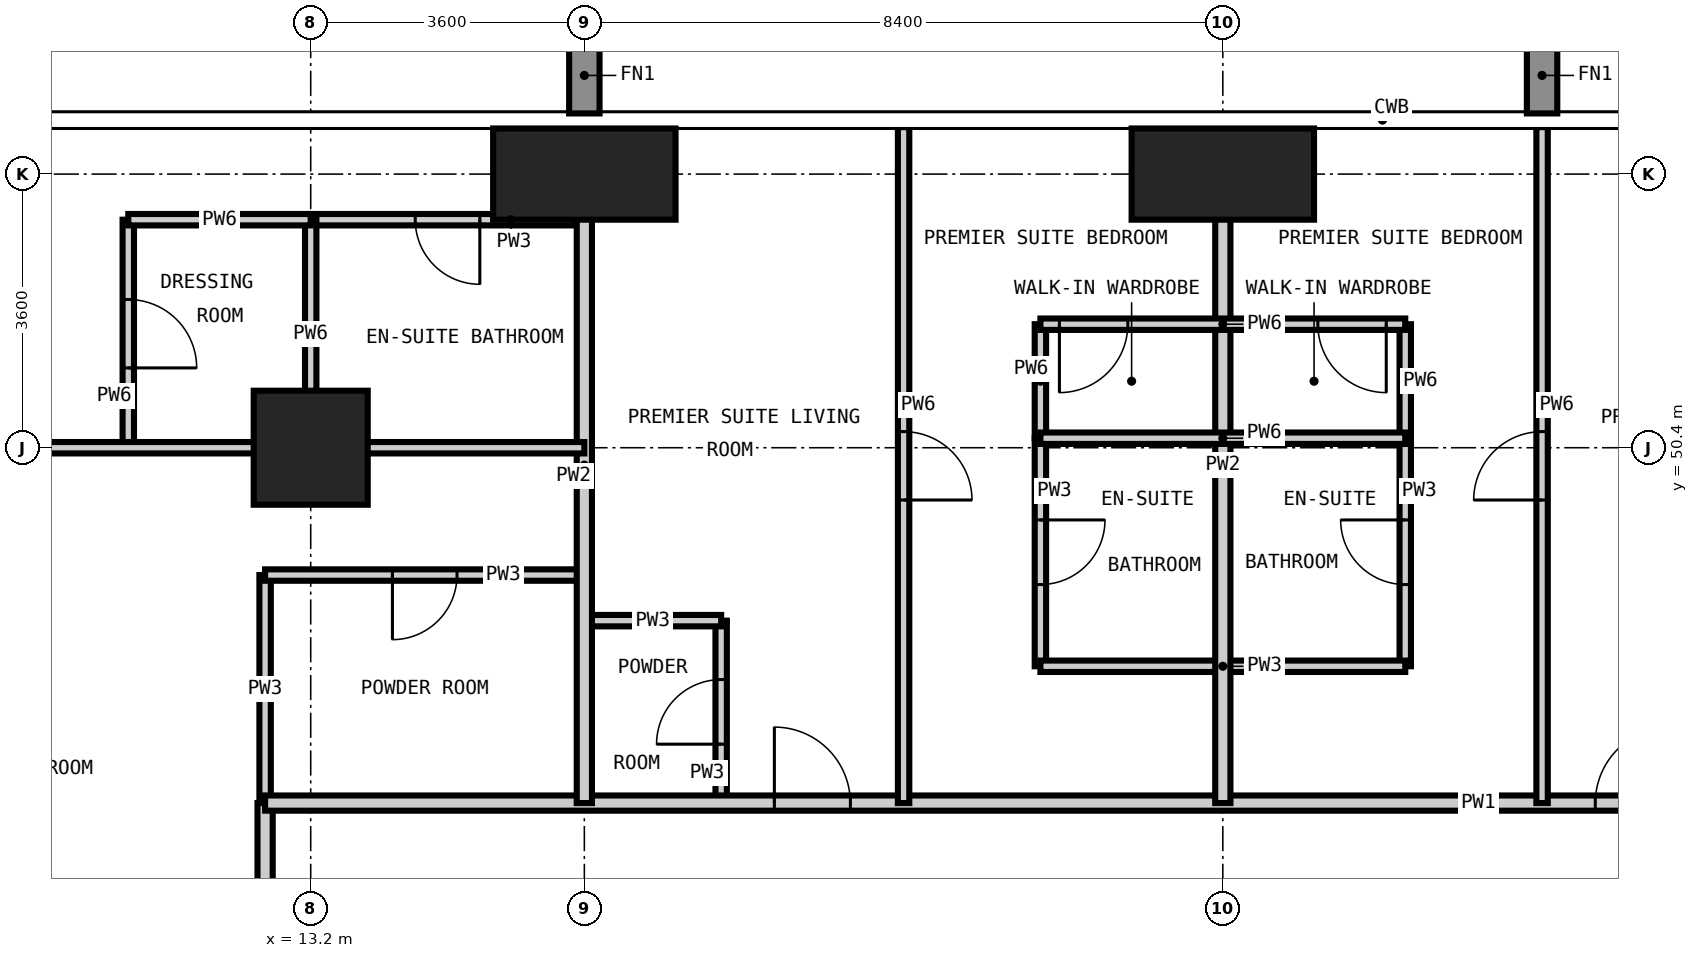
"""IFC4 building model, lengths in metres.
Left out: names, types, materials, properties, quantities, classifications, styles, units other than length and angle.
Written with IfcOpenShell. Run it as: python <this file> out.ifc"""

import sys

from ifc_helpers import new_model, si_unit, direction, frame, frame_2d, origin, origin_2d, place, context, subcontext, project, spatial, rectangle, extrude, element, fill, save


model = new_model("IFC4")
c1 = context("Model", 3, precision=1e-05, world=origin(), true_north=direction((0.0, 1.0)))
c2 = subcontext(c1, "Body", "Model", "MODEL_VIEW")
j1 = project(units=[si_unit("LENGTHUNIT", "METRE"), si_unit("PLANEANGLEUNIT", "RADIAN")], contexts=[c1])
p1 = place(None, origin())
s1 = spatial("IfcSite", under=j1, at=p1, CompositionType="ELEMENT")
p2 = place(p1, origin())
s2 = spatial("IfcBuilding", under=s1, at=p2, CompositionType="ELEMENT")
p3 = place(p2, frame((0.0, 0.0, 122.4)))
s3 = spatial("IfcBuildingStorey", under=s2, at=p3, CompositionType="ELEMENT", Elevation=122.4)
p4 = place(p3, frame((13.2, 50.4, -0.35), z_axis=(0.0, 0.0, 1.0), x_axis=(1.0, 0.0, 0.0)))
e1 = element("IfcColumn", 1, at=p4, inside=s3, PredefinedType="COLUMN", context=c2, shape_type="SweptSolid", body=[
    extrude(rectangle(XDim=1.5, YDim=1.5, at=origin_2d()), origin(), (0.0, 0.0, 1.0), 3.6),
])
for number, where, z_axis, x_axis in (
    (2, (16.8, 54.0, -0.35), (0.0, 0.0, 1.0), (1.0, 0.0, 0.0)),
    (3, (25.2, 54.0, -0.35), (0.0, 0.0, 1.0), (1.0, 0.0, 0.0)),
):
    element("IfcColumn", number, at=place(p3, frame(where, z_axis=z_axis, x_axis=x_axis)), inside=s3, PredefinedType="COLUMN", context=c2, shape_type="SweptSolid", body=[
        extrude(rectangle(XDim=2.4, YDim=1.2, at=origin_2d()), origin(), (0.0, 0.0, 1.0), 3.6),
    ])
p5 = place(p3, frame((12.6, 45.725, 0.0), z_axis=(0.0, 0.0, 1.0), x_axis=(0.0, 1.0, 0.0)))
e4 = element("IfcWall", 4, at=p5, inside=s3, PredefinedType="PARTITIONING", context=c2, shape_type="SweptSolid", body=[
    extrude(rectangle(XDim=3.0, YDim=0.15, at=frame_2d((1.5, 0.0))), origin(), (0.0, 0.0, 1.0), 3.25),
])
p6 = place(p3, frame((18.6, 45.725, 0.0), z_axis=(0.0, 0.0, 1.0), x_axis=(0.0, 1.0, 0.0)))
e5 = element("IfcWall", 5, at=p6, inside=s3, PredefinedType="PARTITIONING", context=c2, shape_type="SweptSolid", body=[
    extrude(rectangle(XDim=2.4, YDim=0.15, at=frame_2d((1.2, 0.0))), origin(), (0.0, 0.0, 1.0), 3.25),
])
p7 = place(p6, frame((0.775, 0.0, 0.0)))
e6 = element("IfcOpeningElement", 6, at=p7, cuts=e5, PredefinedType="OPENING", context=c2, shape_type="SweptSolid", body=[
    extrude(rectangle(XDim=0.85, YDim=2.1, at=frame_2d((0.425, 1.05))), frame((0.0, 0.085, 0.0), z_axis=(0.0, -1.0, 0.0), x_axis=(1.0, 0.0, 0.0)), (0.0, 0.0, 1.0), 0.17),
])
p8 = place(p3, frame((22.8, 47.525, 0.0), z_axis=(0.0, 0.0, 1.0), x_axis=(0.0, 1.0, 0.0)))
e7 = element("IfcWall", 7, at=p8, inside=s3, PredefinedType="PARTITIONING", context=c2, shape_type="SweptSolid", body=[
    extrude(rectangle(XDim=3.0, YDim=0.15, at=frame_2d((1.5, 0.0))), origin(), (0.0, 0.0, 1.0), 3.25),
])
p9 = place(p8, frame((1.075, 0.0, 0.0)))
e8 = element("IfcOpeningElement", 8, at=p9, cuts=e7, PredefinedType="OPENING", context=c2, shape_type="SweptSolid", body=[
    extrude(rectangle(XDim=0.85, YDim=2.1, at=frame_2d((0.425, 1.05))), frame((0.0, 0.085, 0.0), z_axis=(0.0, -1.0, 0.0), x_axis=(1.0, 0.0, 0.0)), (0.0, 0.0, 1.0), 0.17),
])
p10 = place(p3, frame((27.6, 47.525, 0.0), z_axis=(0.0, 0.0, 1.0), x_axis=(0.0, 1.0, 0.0)))
e9 = element("IfcWall", 9, at=p10, inside=s3, PredefinedType="PARTITIONING", context=c2, shape_type="SweptSolid", body=[
    extrude(rectangle(XDim=3.0, YDim=0.15, at=frame_2d((1.5, 0.0))), origin(), (0.0, 0.0, 1.0), 3.25),
])
p11 = place(p10, frame((1.075, 0.0, 0.0)))
e10 = element("IfcOpeningElement", 10, at=p11, cuts=e9, PredefinedType="OPENING", context=c2, shape_type="SweptSolid", body=[
    extrude(rectangle(XDim=0.85, YDim=2.1, at=frame_2d((0.425, 1.05))), frame((0.0, 0.085, 0.0), z_axis=(0.0, -1.0, 0.0), x_axis=(1.0, 0.0, 0.0)), (0.0, 0.0, 1.0), 0.17),
])
p12 = place(p3, frame((22.8, 47.525, 0.0), z_axis=(0.0, 0.0, 1.0), x_axis=(1.0, 0.0, 0.0)))
e11 = element("IfcWall", 11, at=p12, inside=s3, PredefinedType="PARTITIONING", context=c2, shape_type="SweptSolid", body=[
    extrude(rectangle(XDim=4.8, YDim=0.15, at=frame_2d((2.4, 0.0))), origin(), (0.0, 0.0, 1.0), 3.25),
])
p13 = place(p3, frame((16.8, 48.125, 0.0), z_axis=(0.0, 0.0, 1.0), x_axis=(1.0, 0.0, 0.0)))
e12 = element("IfcWall", 12, at=p13, inside=s3, PredefinedType="PARTITIONING", context=c2, shape_type="SweptSolid", body=[
    extrude(rectangle(XDim=1.8, YDim=0.15, at=frame_2d((0.9, 0.0))), origin(), (0.0, 0.0, 1.0), 3.25),
])
p14 = place(p3, frame((12.6, 48.725, 0.0), z_axis=(0.0, 0.0, 1.0), x_axis=(1.0, 0.0, 0.0)))
e13 = element("IfcWall", 13, at=p14, inside=s3, PredefinedType="PARTITIONING", context=c2, shape_type="SweptSolid", body=[
    extrude(rectangle(XDim=4.2, YDim=0.15, at=frame_2d((2.1, 0.0))), origin(), (0.0, 0.0, 1.0), 3.25),
])
p15 = place(p14, frame((1.675, 0.0, 0.0)))
e14 = element("IfcOpeningElement", 14, at=p15, cuts=e13, PredefinedType="OPENING", context=c2, shape_type="SweptSolid", body=[
    extrude(rectangle(XDim=0.85, YDim=2.1, at=frame_2d((0.425, 1.05))), frame((0.0, 0.085, 0.0), z_axis=(0.0, -1.0, 0.0), x_axis=(1.0, 0.0, 0.0)), (0.0, 0.0, 1.0), 0.17),
])
p16 = place(p3, frame((13.2, 53.4, 0.0), z_axis=(0.0, 0.0, 1.0), x_axis=(1.0, 0.0, 0.0)))
e15 = element("IfcWall", 15, at=p16, inside=s3, PredefinedType="PARTITIONING", context=c2, shape_type="SweptSolid", body=[
    extrude(rectangle(XDim=3.6, YDim=0.15, at=frame_2d((1.8, 0.0))), origin(), (0.0, 0.0, 1.0), 3.25),
])
p17 = place(p16, frame((1.375, 0.0, 0.0)))
e16 = element("IfcOpeningElement", 16, at=p17, cuts=e15, PredefinedType="OPENING", context=c2, shape_type="SweptSolid", body=[
    extrude(rectangle(XDim=0.85, YDim=2.1, at=frame_2d((0.425, 1.05))), frame((0.0, 0.085, 0.0), z_axis=(0.0, -1.0, 0.0), x_axis=(1.0, 0.0, 0.0)), (0.0, 0.0, 1.0), 0.17),
])
p18 = place(p3, frame((12.6, 13.675, 0.0), z_axis=(0.0, 0.0, 1.0), x_axis=(0.0, 1.0, 0.0)))
e17 = element("IfcWall", 17, at=p18, inside=s3, PredefinedType="PARTITIONING", context=c2, shape_type="SweptSolid", body=[
    extrude(rectangle(XDim=32.05, YDim=0.2, at=frame_2d((16.025, 0.0))), origin(), (0.0, 0.0, 1.0), 3.25),
])
p19 = place(p18, frame((6.825, 0.0, 0.0)))
e18 = element("IfcOpeningElement", 18, at=p19, cuts=e17, PredefinedType="OPENING", context=c2, shape_type="SweptSolid", body=[
    extrude(rectangle(XDim=1.0, YDim=2.2, at=frame_2d((0.5, 1.1))), frame((0.0, 0.11, 0.0), z_axis=(0.0, -1.0, 0.0), x_axis=(1.0, 0.0, 0.0)), (0.0, 0.0, 1.0), 0.22),
])
p20 = place(p18, frame((15.225, 0.0, 0.0)))
e19 = element("IfcOpeningElement", 19, at=p20, cuts=e17, PredefinedType="OPENING", context=c2, shape_type="SweptSolid", body=[
    extrude(rectangle(XDim=1.0, YDim=2.2, at=frame_2d((0.5, 1.1))), frame((0.0, 0.11, 0.0), z_axis=(0.0, -1.0, 0.0), x_axis=(1.0, 0.0, 0.0)), (0.0, 0.0, 1.0), 0.22),
])
p21 = place(p18, frame((23.625, 0.0, 0.0)))
e20 = element("IfcOpeningElement", 20, at=p21, cuts=e17, PredefinedType="OPENING", context=c2, shape_type="SweptSolid", body=[
    extrude(rectangle(XDim=1.0, YDim=2.2, at=frame_2d((0.5, 1.1))), frame((0.0, 0.11, 0.0), z_axis=(0.0, -1.0, 0.0), x_axis=(1.0, 0.0, 0.0)), (0.0, 0.0, 1.0), 0.22),
])
p22 = place(p18, frame((1.063, 0.0, 0.0)))
e21 = element("IfcOpeningElement", 21, at=p22, cuts=e17, PredefinedType="OPENING", context=c2, shape_type="SweptSolid", body=[
    extrude(rectangle(XDim=1.0, YDim=2.2, at=frame_2d((0.5, 1.1))), frame((0.0, 0.11, 0.0), z_axis=(0.0, -1.0, 0.0), x_axis=(1.0, 0.0, 0.0)), (0.0, 0.0, 1.0), 0.22),
])
p23 = place(p18, frame((29.687, 0.0, 0.0)))
e22 = element("IfcOpeningElement", 22, at=p23, cuts=e17, PredefinedType="OPENING", context=c2, shape_type="SweptSolid", body=[
    extrude(rectangle(XDim=1.0, YDim=2.2, at=frame_2d((0.5, 1.1))), frame((0.0, 0.11, 0.0), z_axis=(0.0, -1.0, 0.0), x_axis=(1.0, 0.0, 0.0)), (0.0, 0.0, 1.0), 0.22),
])
p24 = place(p3, frame((12.6, 45.725, 0.0), z_axis=(0.0, 0.0, 1.0), x_axis=(1.0, 0.0, 0.0)))
e23 = element("IfcWall", 23, at=p24, inside=s3, PredefinedType="PARTITIONING", context=c2, shape_type="SweptSolid", body=[
    extrude(rectangle(XDim=31.925, YDim=0.2, at=frame_2d((15.962, 0.0))), origin(), (0.0, 0.0, 1.0), 3.25),
])
p25 = place(p24, frame((6.7, 0.0, 0.0)))
e24 = element("IfcOpeningElement", 24, at=p25, cuts=e23, PredefinedType="OPENING", context=c2, shape_type="SweptSolid", body=[
    extrude(rectangle(XDim=1.0, YDim=2.2, at=frame_2d((0.5, 1.1))), frame((0.0, 0.11, 0.0), z_axis=(0.0, -1.0, 0.0), x_axis=(1.0, 0.0, 0.0)), (0.0, 0.0, 1.0), 0.22),
])
p26 = place(p24, frame((17.5, 0.0, 0.0)))
e25 = element("IfcOpeningElement", 25, at=p26, cuts=e23, PredefinedType="OPENING", context=c2, shape_type="SweptSolid", body=[
    extrude(rectangle(XDim=1.0, YDim=2.2, at=frame_2d((0.5, 1.1))), frame((0.0, 0.11, 0.0), z_axis=(0.0, -1.0, 0.0), x_axis=(1.0, 0.0, 0.0)), (0.0, 0.0, 1.0), 0.22),
])
p27 = place(p24, frame((23.5, 0.0, 0.0)))
e26 = element("IfcOpeningElement", 26, at=p27, cuts=e23, PredefinedType="OPENING", context=c2, shape_type="SweptSolid", body=[
    extrude(rectangle(XDim=1.0, YDim=2.2, at=frame_2d((0.5, 1.1))), frame((0.0, 0.11, 0.0), z_axis=(0.0, -1.0, 0.0), x_axis=(1.0, 0.0, 0.0)), (0.0, 0.0, 1.0), 0.22),
])
for number, where, z_axis, x_axis in (
    (27, (16.8, 45.725, 0.0), (0.0, 0.0, 1.0), (0.0, 1.0, 0.0)),
    (28, (25.2, 45.725, 0.0), (0.0, 0.0, 1.0), (0.0, 1.0, 0.0)),
):
    element("IfcWall", number, at=place(p3, frame(where, z_axis=z_axis, x_axis=x_axis)), inside=s3, PredefinedType="PARTITIONING", context=c2, shape_type="SweptSolid", body=[
        extrude(rectangle(XDim=8.893, YDim=0.2, at=frame_2d((4.446, 0.0))), origin(), (0.0, 0.0, 1.0), 3.25),
    ])
p28 = place(p3, frame((10.8, 50.4, 0.0), z_axis=(0.0, 0.0, 1.0), x_axis=(0.0, 1.0, 0.0)))
e29 = element("IfcWall", 29, at=p28, inside=s3, PredefinedType="PARTITIONING", context=c2, shape_type="SweptSolid", body=[
    extrude(rectangle(XDim=3.0, YDim=0.15, at=frame_2d((1.5, 0.0))), origin(), (0.0, 0.0, 1.0), 3.25),
])
p29 = place(p28, frame((1.05, 0.0, 0.0)))
e30 = element("IfcOpeningElement", 30, at=p29, cuts=e29, PredefinedType="OPENING", context=c2, shape_type="SweptSolid", body=[
    extrude(rectangle(XDim=0.9, YDim=2.1, at=frame_2d((0.45, 1.05))), frame((0.0, 0.085, 0.0), z_axis=(0.0, -1.0, 0.0), x_axis=(1.0, 0.0, 0.0)), (0.0, 0.0, 1.0), 0.17),
])
p30 = place(p3, frame((13.2, 50.4, 0.0), z_axis=(0.0, 0.0, 1.0), x_axis=(0.0, 1.0, 0.0)))
e31 = element("IfcWall", 31, at=p30, inside=s3, PredefinedType="PARTITIONING", context=c2, shape_type="SweptSolid", body=[
    extrude(rectangle(XDim=3.0, YDim=0.15, at=frame_2d((1.5, 0.0))), origin(), (0.0, 0.0, 1.0), 3.25),
])
p31 = place(p3, frame((21.0, 45.725, 0.0), z_axis=(0.0, 0.0, 1.0), x_axis=(0.0, 1.0, 0.0)))
e32 = element("IfcWall", 32, at=p31, inside=s3, PredefinedType="PARTITIONING", context=c2, shape_type="SweptSolid", body=[
    extrude(rectangle(XDim=8.893, YDim=0.15, at=frame_2d((4.446, 0.0))), origin(), (0.0, 0.0, 1.0), 3.25),
])
p32 = place(p31, frame((3.987, 0.0, 0.0)))
e33 = element("IfcOpeningElement", 33, at=p32, cuts=e32, PredefinedType="OPENING", context=c2, shape_type="SweptSolid", body=[
    extrude(rectangle(XDim=0.9, YDim=2.1, at=frame_2d((0.45, 1.05))), frame((0.0, 0.085, 0.0), z_axis=(0.0, -1.0, 0.0), x_axis=(1.0, 0.0, 0.0)), (0.0, 0.0, 1.0), 0.17),
])
for number, where, z_axis, x_axis in (
    (34, (22.8, 50.525, 0.0), (0.0, 0.0, 1.0), (0.0, 1.0, 0.0)),
    (35, (27.6, 50.525, 0.0), (0.0, 0.0, 1.0), (0.0, 1.0, 0.0)),
):
    element("IfcWall", number, at=place(p3, frame(where, z_axis=z_axis, x_axis=x_axis)), inside=s3, PredefinedType="PARTITIONING", context=c2, shape_type="SweptSolid", body=[
        extrude(rectangle(XDim=1.5, YDim=0.15, at=frame_2d((0.75, 0.0))), origin(), (0.0, 0.0, 1.0), 3.25),
    ])
p33 = place(p3, frame((29.4, 45.725, 0.0), z_axis=(0.0, 0.0, 1.0), x_axis=(0.0, 1.0, 0.0)))
e36 = element("IfcWall", 36, at=p33, inside=s3, PredefinedType="PARTITIONING", context=c2, shape_type="SweptSolid", body=[
    extrude(rectangle(XDim=8.893, YDim=0.15, at=frame_2d((4.446, 0.0))), origin(), (0.0, 0.0, 1.0), 3.25),
])
p34 = place(p33, frame((3.987, 0.0, 0.0)))
e37 = element("IfcOpeningElement", 37, at=p34, cuts=e36, PredefinedType="OPENING", context=c2, shape_type="SweptSolid", body=[
    extrude(rectangle(XDim=0.9, YDim=2.1, at=frame_2d((0.45, 1.05))), frame((0.0, 0.085, 0.0), z_axis=(0.0, -1.0, 0.0), x_axis=(1.0, 0.0, 0.0)), (0.0, 0.0, 1.0), 0.17),
])
p35 = place(p3, frame((-0.018, 50.4, 0.0), z_axis=(0.0, 0.0, 1.0), x_axis=(1.0, 0.0, 0.0)))
e38 = element("IfcWall", 38, at=p35, inside=s3, PredefinedType="PARTITIONING", context=c2, shape_type="SweptSolid", body=[
    extrude(rectangle(XDim=16.818, YDim=0.15, at=frame_2d((8.409, 0.0))), origin(), (0.0, 0.0, 1.0), 3.25),
])
p36 = place(p35, frame((5.668, 0.0, 0.0)))
e39 = element("IfcOpeningElement", 39, at=p36, cuts=e38, PredefinedType="OPENING", context=c2, shape_type="SweptSolid", body=[
    extrude(rectangle(XDim=0.9, YDim=2.1, at=frame_2d((0.45, 1.05))), frame((0.0, 0.085, 0.0), z_axis=(0.0, -1.0, 0.0), x_axis=(1.0, 0.0, 0.0)), (0.0, 0.0, 1.0), 0.17),
])
p37 = place(p3, frame((22.8, 50.525, 0.0), z_axis=(0.0, 0.0, 1.0), x_axis=(1.0, 0.0, 0.0)))
e40 = element("IfcWall", 40, at=p37, inside=s3, PredefinedType="PARTITIONING", context=c2, shape_type="SweptSolid", body=[
    extrude(rectangle(XDim=4.8, YDim=0.15, at=frame_2d((2.4, 0.0))), origin(), (0.0, 0.0, 1.0), 3.25),
])
p38 = place(p3, frame((22.8, 52.025, 0.0), z_axis=(0.0, 0.0, 1.0), x_axis=(1.0, 0.0, 0.0)))
e41 = element("IfcWall", 41, at=p38, inside=s3, PredefinedType="PARTITIONING", context=c2, shape_type="SweptSolid", body=[
    extrude(rectangle(XDim=4.8, YDim=0.15, at=frame_2d((2.4, 0.0))), origin(), (0.0, 0.0, 1.0), 3.25),
])
p39 = place(p38, frame((0.25, 0.0, 0.0)))
e42 = element("IfcOpeningElement", 42, at=p39, cuts=e41, PredefinedType="OPENING", context=c2, shape_type="SweptSolid", body=[
    extrude(rectangle(XDim=0.9, YDim=2.1, at=frame_2d((0.45, 1.05))), frame((0.0, 0.085, 0.0), z_axis=(0.0, -1.0, 0.0), x_axis=(1.0, 0.0, 0.0)), (0.0, 0.0, 1.0), 0.17),
])
p40 = place(p38, frame((3.65, 0.0, 0.0)))
e43 = element("IfcOpeningElement", 43, at=p40, cuts=e41, PredefinedType="OPENING", context=c2, shape_type="SweptSolid", body=[
    extrude(rectangle(XDim=0.9, YDim=2.1, at=frame_2d((0.45, 1.05))), frame((0.0, 0.085, 0.0), z_axis=(0.0, -1.0, 0.0), x_axis=(1.0, 0.0, 0.0)), (0.0, 0.0, 1.0), 0.17),
])
p41 = place(p3, frame((10.8, 53.4, 0.0), z_axis=(0.0, 0.0, 1.0), x_axis=(1.0, 0.0, 0.0)))
e44 = element("IfcWall", 44, at=p41, inside=s3, PredefinedType="PARTITIONING", context=c2, shape_type="SweptSolid", body=[
    extrude(rectangle(XDim=2.4, YDim=0.15, at=frame_2d((1.2, 0.0))), origin(), (0.0, 0.0, 1.0), 3.25),
])
p42 = place(p25, origin())
e45 = element("IfcDoor", 45, at=p42, inside=s3, OperationType="SINGLE_SWING_LEFT", PredefinedType="DOOR", context=c2, shape_type="SweptSolid", body=[
    extrude(rectangle(XDim=1.0, YDim=2.2, at=frame_2d((0.5, 1.1))), frame((0.0, 0.025, 0.0), z_axis=(0.0, -1.0, 0.0), x_axis=(1.0, 0.0, 0.0)), (0.0, 0.0, 1.0), 0.05),
])
fill(e24, e45)
p43 = place(p7, origin())
e46 = element("IfcDoor", 46, at=p43, inside=s3, OperationType="SINGLE_SWING_LEFT", PredefinedType="DOOR", context=c2, shape_type="SweptSolid", body=[
    extrude(rectangle(XDim=0.85, YDim=2.1, at=frame_2d((0.425, 1.05))), frame((0.0, 0.025, 0.0), z_axis=(0.0, -1.0, 0.0), x_axis=(1.0, 0.0, 0.0)), (0.0, 0.0, 1.0), 0.05),
])
fill(e6, e46)
p44 = place(p32, frame((0.9, 0.0, 0.0), z_axis=(0.0, 0.0, 1.0), x_axis=(-1.0, 0.0, 0.0)))
e47 = element("IfcDoor", 47, at=p44, inside=s3, OperationType="SINGLE_SWING_RIGHT", PredefinedType="DOOR", context=c2, shape_type="SweptSolid", body=[
    extrude(rectangle(XDim=0.9, YDim=2.1, at=frame_2d((0.45, 1.05))), frame((0.0, 0.025, 0.0), z_axis=(0.0, -1.0, 0.0), x_axis=(1.0, 0.0, 0.0)), (0.0, 0.0, 1.0), 0.05),
])
fill(e33, e47)
p45 = place(p9, frame((0.85, 0.0, 0.0), z_axis=(0.0, 0.0, 1.0), x_axis=(-1.0, 0.0, 0.0)))
e48 = element("IfcDoor", 48, at=p45, inside=s3, OperationType="SINGLE_SWING_LEFT", PredefinedType="DOOR", context=c2, shape_type="SweptSolid", body=[
    extrude(rectangle(XDim=0.85, YDim=2.1, at=frame_2d((0.425, 1.05))), frame((0.0, 0.025, 0.0), z_axis=(0.0, -1.0, 0.0), x_axis=(1.0, 0.0, 0.0)), (0.0, 0.0, 1.0), 0.05),
])
fill(e8, e48)
p46 = place(p39, frame((0.9, 0.0, 0.0), z_axis=(0.0, 0.0, 1.0), x_axis=(-1.0, 0.0, 0.0)))
e49 = element("IfcDoor", 49, at=p46, inside=s3, OperationType="SINGLE_SWING_RIGHT", PredefinedType="DOOR", context=c2, shape_type="SweptSolid", body=[
    extrude(rectangle(XDim=0.9, YDim=2.1, at=frame_2d((0.45, 1.05))), frame((0.0, 0.025, 0.0), z_axis=(0.0, -1.0, 0.0), x_axis=(1.0, 0.0, 0.0)), (0.0, 0.0, 1.0), 0.05),
])
fill(e42, e49)
p47 = place(p26, origin())
e50 = element("IfcDoor", 50, at=p47, inside=s3, OperationType="SINGLE_SWING_RIGHT", PredefinedType="DOOR", context=c2, shape_type="SweptSolid", body=[
    extrude(rectangle(XDim=1.0, YDim=2.2, at=frame_2d((0.5, 1.1))), frame((0.0, 0.025, 0.0), z_axis=(0.0, -1.0, 0.0), x_axis=(1.0, 0.0, 0.0)), (0.0, 0.0, 1.0), 0.05),
])
fill(e25, e50)
p48 = place(p34, origin())
e51 = element("IfcDoor", 51, at=p48, inside=s3, OperationType="SINGLE_SWING_LEFT", PredefinedType="DOOR", context=c2, shape_type="SweptSolid", body=[
    extrude(rectangle(XDim=0.9, YDim=2.1, at=frame_2d((0.45, 1.05))), frame((0.0, 0.025, 0.0), z_axis=(0.0, -1.0, 0.0), x_axis=(1.0, 0.0, 0.0)), (0.0, 0.0, 1.0), 0.05),
])
fill(e37, e51)
p49 = place(p11, origin())
e52 = element("IfcDoor", 52, at=p49, inside=s3, OperationType="SINGLE_SWING_RIGHT", PredefinedType="DOOR", context=c2, shape_type="SweptSolid", body=[
    extrude(rectangle(XDim=0.85, YDim=2.1, at=frame_2d((0.425, 1.05))), frame((0.0, 0.025, 0.0), z_axis=(0.0, -1.0, 0.0), x_axis=(1.0, 0.0, 0.0)), (0.0, 0.0, 1.0), 0.05),
])
fill(e10, e52)
p50 = place(p40, frame((0.9, 0.0, 0.0), z_axis=(0.0, 0.0, 1.0), x_axis=(-1.0, 0.0, 0.0)))
e53 = element("IfcDoor", 53, at=p50, inside=s3, OperationType="SINGLE_SWING_LEFT", PredefinedType="DOOR", context=c2, shape_type="SweptSolid", body=[
    extrude(rectangle(XDim=0.9, YDim=2.1, at=frame_2d((0.45, 1.05))), frame((0.0, 0.025, 0.0), z_axis=(0.0, -1.0, 0.0), x_axis=(1.0, 0.0, 0.0)), (0.0, 0.0, 1.0), 0.05),
])
fill(e43, e53)
p51 = place(p15, frame((0.85, 0.0, 0.0), z_axis=(0.0, 0.0, 1.0), x_axis=(-1.0, 0.0, 0.0)))
e54 = element("IfcDoor", 54, at=p51, inside=s3, OperationType="SINGLE_SWING_RIGHT", PredefinedType="DOOR", context=c2, shape_type="SweptSolid", body=[
    extrude(rectangle(XDim=0.85, YDim=2.1, at=frame_2d((0.425, 1.05))), frame((0.0, 0.025, 0.0), z_axis=(0.0, -1.0, 0.0), x_axis=(1.0, 0.0, 0.0)), (0.0, 0.0, 1.0), 0.05),
])
fill(e14, e54)
p52 = place(p17, frame((0.85, 0.0, 0.0), z_axis=(0.0, 0.0, 1.0), x_axis=(-1.0, 0.0, 0.0)))
e55 = element("IfcDoor", 55, at=p52, inside=s3, OperationType="SINGLE_SWING_LEFT", PredefinedType="DOOR", context=c2, shape_type="SweptSolid", body=[
    extrude(rectangle(XDim=0.85, YDim=2.1, at=frame_2d((0.425, 1.05))), frame((0.0, 0.025, 0.0), z_axis=(0.0, -1.0, 0.0), x_axis=(1.0, 0.0, 0.0)), (0.0, 0.0, 1.0), 0.05),
])
fill(e16, e55)
p53 = place(p29, frame((0.9, 0.0, 0.0), z_axis=(0.0, 0.0, 1.0), x_axis=(-1.0, 0.0, 0.0)))
e56 = element("IfcDoor", 56, at=p53, inside=s3, OperationType="SINGLE_SWING_RIGHT", PredefinedType="DOOR", context=c2, shape_type="SweptSolid", body=[
    extrude(rectangle(XDim=0.9, YDim=2.1, at=frame_2d((0.45, 1.05))), frame((0.0, 0.025, 0.0), z_axis=(0.0, -1.0, 0.0), x_axis=(1.0, 0.0, 0.0)), (0.0, 0.0, 1.0), 0.05),
])
fill(e30, e56)
save(model, sys.argv[1])
